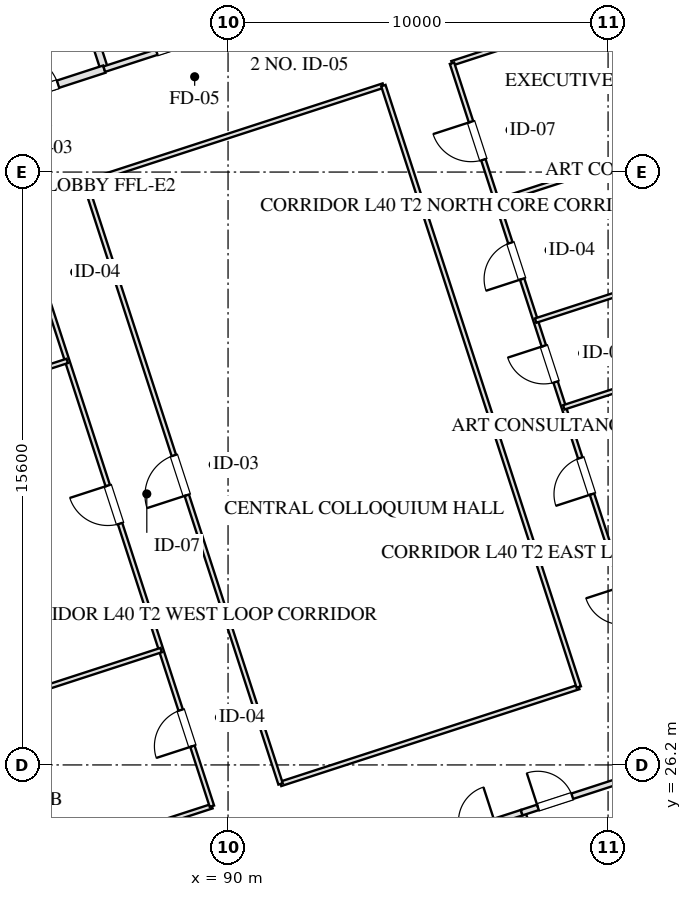
"""IFC4 building model, lengths in metres.
Left out: names, types, materials, properties, quantities, classifications, styles, units other than length and angle.
Written with IfcOpenShell. Run it as: python <this file> out.ifc"""

import sys

from ifc_helpers import new_model, si_unit, direction, frame, frame_2d, origin, place, context, subcontext, project, spatial, rectangle, extrude, element, fill, save


model = new_model("IFC4")
c1 = context("Model", 3, precision=1e-05, world=origin(), true_north=direction((0.0, 1.0)))
c2 = subcontext(c1, "Body", "Model", "MODEL_VIEW")
j1 = project(units=[si_unit("LENGTHUNIT", "METRE"), si_unit("PLANEANGLEUNIT", "RADIAN")], contexts=[c1])
p1 = place(None, origin())
s1 = spatial("IfcSite", under=j1, at=p1, CompositionType="ELEMENT")
p2 = place(p1, origin())
s2 = spatial("IfcBuilding", under=s1, at=p2, CompositionType="ELEMENT")
p3 = place(p2, frame((0.0, 0.0, 152.95)))
s3 = spatial("IfcBuildingStorey", under=s2, at=p3, CompositionType="ELEMENT", Elevation=152.95)
p4 = place(p3, frame((98.224, 59.173, 0.0), z_axis=(0.0, 0.0, 1.0), x_axis=(0.309014228706, -0.951057414911, 0.0)))
e1 = element("IfcWall", 1, at=p4, inside=s3, PredefinedType="SOLIDWALL", context=c2, shape_type="SweptSolid", body=[
    extrude(rectangle(XDim=42.8, YDim=0.4, at=frame_2d((21.4, 0.0))), origin(), (0.0, 0.0, 1.0), 2.61),
])
p5 = place(p4, frame((23.95, 0.0, 0.0)))
e2 = element("IfcOpeningElement", 2, at=p5, cuts=e1, PredefinedType="OPENING", context=c2, shape_type="SweptSolid", body=[
    extrude(rectangle(XDim=1.1, YDim=2.15, at=frame_2d((0.55, 1.075))), frame((0.0, 0.21, 0.0), z_axis=(0.0, -1.0, 0.0), x_axis=(1.0, 0.0, 0.0)), (0.0, 0.0, 1.0), 0.42),
])
p6 = place(p3, frame((97.727, 24.944, 0.0), z_axis=(0.0, 0.0, 1.0), x_axis=(0.309016001439, -0.951056838919, 0.0)))
e3 = element("IfcWall", 3, at=p6, inside=s3, PredefinedType="PARTITIONING", context=c2, shape_type="SweptSolid", body=[
    extrude(rectangle(XDim=8.43, YDim=0.2, at=frame_2d((4.215, 0.0))), origin(), (0.0, 0.0, 1.0), 3.175),
])
p7 = place(p3, frame((93.542, 23.585, 0.0), z_axis=(0.0, 0.0, 1.0), x_axis=(0.951063829732, 0.308994485023, 0.0)))
e4 = element("IfcWall", 4, at=p7, inside=s3, PredefinedType="PARTITIONING", context=c2, shape_type="SweptSolid", body=[
    extrude(rectangle(XDim=4.4, YDim=0.15, at=frame_2d((2.2, 0.0))), origin(), (0.0, 0.0, 1.0), 3.175),
])
p8 = place(p7, frame((0.55, 0.0, 0.0)))
e5 = element("IfcOpeningElement", 5, at=p8, cuts=e4, PredefinedType="OPENING", context=c2, shape_type="SweptSolid", body=[
    extrude(rectangle(XDim=0.95, YDim=2.05, at=frame_2d((0.475, 1.025))), frame((0.0, 0.085, 0.0), z_axis=(0.0, -1.0, 0.0), x_axis=(1.0, 0.0, 0.0)), (0.0, 0.0, 1.0), 0.17),
])
p9 = place(p7, frame((2.7, 0.0, 0.0)))
e6 = element("IfcOpeningElement", 6, at=p9, cuts=e4, PredefinedType="OPENING", context=c2, shape_type="SweptSolid", body=[
    extrude(rectangle(XDim=0.95, YDim=2.05, at=frame_2d((0.475, 1.025))), frame((0.0, 0.085, 0.0), z_axis=(0.0, -1.0, 0.0), x_axis=(1.0, 0.0, 0.0)), (0.0, 0.0, 1.0), 0.17),
])
p10 = place(p3, frame((97.727, 24.944, 0.0), z_axis=(0.0, 0.0, 1.0), x_axis=(0.951036872128, 0.309077446369, 0.0)))
e7 = element("IfcWall", 7, at=p10, inside=s3, PredefinedType="PARTITIONING", context=c2, shape_type="SweptSolid", body=[
    extrude(rectangle(XDim=3.2, YDim=0.15, at=frame_2d((1.6, 0.0))), origin(), (0.0, 0.0, 1.0), 3.175),
])
p11 = place(p10, frame((0.45, 0.0, 0.0)))
e8 = element("IfcOpeningElement", 8, at=p11, cuts=e7, PredefinedType="OPENING", context=c2, shape_type="SweptSolid", body=[
    extrude(rectangle(XDim=0.95, YDim=2.05, at=frame_2d((0.475, 1.025))), frame((0.0, 0.085, 0.0), z_axis=(0.0, -1.0, 0.0), x_axis=(1.0, 0.0, 0.0)), (0.0, 0.0, 1.0), 0.17),
])
p12 = place(p3, frame((86.743, 44.508, 0.0), z_axis=(0.0, 0.0, 1.0), x_axis=(-0.309016001439, 0.951056838919, 0.0)))
e9 = element("IfcWall", 9, at=p12, inside=s3, PredefinedType="PARTITIONING", context=c2, shape_type="SweptSolid", body=[
    extrude(rectangle(XDim=8.43, YDim=0.2, at=frame_2d((4.215, 0.0))), origin(), (0.0, 0.0, 1.0), 3.175),
])
p13 = place(p3, frame((83.101, 43.324, 0.0), z_axis=(0.0, 0.0, 1.0), x_axis=(0.951052804469, 0.309028417967, 0.0)))
e10 = element("IfcWall", 10, at=p13, inside=s3, PredefinedType="PARTITIONING", context=c2, shape_type="SweptSolid", body=[
    extrude(rectangle(XDim=3.83, YDim=0.2, at=frame_2d((1.915, 0.0))), origin(), (0.0, 0.0, 1.0), 3.175),
])
p14 = place(p13, frame((1.35, 0.0, 0.0)))
e11 = element("IfcOpeningElement", 11, at=p14, cuts=e10, PredefinedType="OPENING", context=c2, shape_type="SweptSolid", body=[
    extrude(rectangle(XDim=1.2, YDim=2.05, at=frame_2d((0.6, 1.025))), frame((0.0, 0.11, 0.0), z_axis=(0.0, -1.0, 0.0), x_axis=(1.0, 0.0, 0.0)), (0.0, 0.0, 1.0), 0.22),
])
p15 = place(p3, frame((86.743, 44.508, 0.0), z_axis=(0.0, 0.0, 1.0), x_axis=(0.951063829732, 0.308994485023, 0.0)))
e12 = element("IfcWall", 12, at=p15, inside=s3, PredefinedType="PARTITIONING", context=c2, shape_type="SweptSolid", body=[
    extrude(rectangle(XDim=4.4, YDim=0.15, at=frame_2d((2.2, 0.0))), origin(), (0.0, 0.0, 1.0), 3.175),
])
p16 = place(p15, frame((1.45, 0.0, 0.0)))
e13 = element("IfcOpeningElement", 13, at=p16, cuts=e12, PredefinedType="OPENING", context=c2, shape_type="SweptSolid", body=[
    extrude(rectangle(XDim=1.5, YDim=2.05, at=frame_2d((0.75, 1.025))), frame((0.0, 0.085, 0.0), z_axis=(0.0, -1.0, 0.0), x_axis=(1.0, 0.0, 0.0)), (0.0, 0.0, 1.0), 0.17),
])
p17 = place(p3, frame((77.925, 21.328, 0.0), z_axis=(0.0, 0.0, 1.0), x_axis=(0.95105749975, 0.309013967595, 0.0)))
e14 = element("IfcWall", 14, at=p17, inside=s3, PredefinedType="PARTITIONING", context=c2, shape_type="SweptSolid", body=[
    extrude(rectangle(XDim=12.25, YDim=0.12, at=frame_2d((6.125, 0.0))), origin(), (0.0, 0.0, 1.0), 3.175),
])
p18 = place(p3, frame((91.382, 25.701, 0.0), z_axis=(0.0, 0.0, 1.0), x_axis=(0.951061683147, 0.309001091988, 0.0)))
e15 = element("IfcWall", 15, at=p18, inside=s3, PredefinedType="PARTITIONING", context=c2, shape_type="SweptSolid", body=[
    extrude(rectangle(XDim=8.25, YDim=0.12, at=frame_2d((4.125, 0.0))), origin(), (0.0, 0.0, 1.0), 3.175),
])
p19 = place(p3, frame((86.24, 41.527, 0.0), z_axis=(0.0, 0.0, 1.0), x_axis=(0.951058857521, 0.309009788731, 0.0)))
e16 = element("IfcWall", 16, at=p19, inside=s3, PredefinedType="PARTITIONING", context=c2, shape_type="SweptSolid", body=[
    extrude(rectangle(XDim=8.25, YDim=0.12, at=frame_2d((4.125, 0.0))), origin(), (0.0, 0.0, 1.0), 3.175),
])
p20 = place(p3, frame((95.893, 44.663, 0.0), z_axis=(0.0, 0.0, 1.0), x_axis=(0.951059735424, 0.30900708674, 0.0)))
e17 = element("IfcWall", 17, at=p20, inside=s3, PredefinedType="PARTITIONING", context=c2, shape_type="SweptSolid", body=[
    extrude(rectangle(XDim=6.5, YDim=0.12, at=frame_2d((3.25, 0.0))), origin(), (0.0, 0.0, 1.0), 3.175),
])
p21 = place(p3, frame((89.575, 25.114, 0.0), z_axis=(0.0, 0.0, 1.0), x_axis=(-0.30901773025, 0.951056277195, 0.0)))
e18 = element("IfcWall", 18, at=p21, inside=s3, PredefinedType="PARTITIONING", context=c2, shape_type="SweptSolid", body=[
    extrude(rectangle(XDim=16.64, YDim=0.12, at=frame_2d((8.32, 0.0))), origin(), (0.0, 0.0, 1.0), 3.175),
])
p22 = place(p21, frame((1.66, 0.0, 0.0)))
e19 = element("IfcOpeningElement", 19, at=p22, cuts=e18, PredefinedType="OPENING", context=c2, shape_type="SweptSolid", body=[
    extrude(rectangle(XDim=1.0, YDim=2.05, at=frame_2d((0.5, 1.025))), frame((0.0, 0.07, 0.0), z_axis=(0.0, -1.0, 0.0), x_axis=(1.0, 0.0, 0.0)), (0.0, 0.0, 1.0), 0.14),
])
p23 = place(p21, frame((7.82, 0.0, 0.0)))
e20 = element("IfcOpeningElement", 20, at=p23, cuts=e18, PredefinedType="OPENING", context=c2, shape_type="SweptSolid", body=[
    extrude(rectangle(XDim=1.05, YDim=2.05, at=frame_2d((0.525, 1.025))), frame((0.0, 0.07, 0.0), z_axis=(0.0, -1.0, 0.0), x_axis=(1.0, 0.0, 0.0)), (0.0, 0.0, 1.0), 0.14),
])
p24 = place(p21, frame((13.98, 0.0, 0.0)))
e21 = element("IfcOpeningElement", 21, at=p24, cuts=e18, PredefinedType="OPENING", context=c2, shape_type="SweptSolid", body=[
    extrude(rectangle(XDim=1.0, YDim=2.05, at=frame_2d((0.5, 1.025))), frame((0.0, 0.07, 0.0), z_axis=(0.0, -1.0, 0.0), x_axis=(1.0, 0.0, 0.0)), (0.0, 0.0, 1.0), 0.14),
])
p25 = place(p3, frame((91.382, 25.701, 0.0), z_axis=(0.0, 0.0, 1.0), x_axis=(-0.309004459387, 0.951060589068, 0.0)))
e22 = element("IfcWall", 22, at=p25, inside=s3, PredefinedType="PARTITIONING", context=c2, shape_type="SweptSolid", body=[
    extrude(rectangle(XDim=16.64, YDim=0.12, at=frame_2d((8.32, 0.0))), origin(), (0.0, 0.0, 1.0), 3.175),
])
p26 = place(p25, frame((7.987, 0.0, 0.0)))
e23 = element("IfcOpeningElement", 23, at=p26, cuts=e22, PredefinedType="OPENING", context=c2, shape_type="SweptSolid", body=[
    extrude(rectangle(XDim=1.1, YDim=2.05, at=frame_2d((0.55, 1.025))), frame((0.0, 0.07, 0.0), z_axis=(0.0, -1.0, 0.0), x_axis=(1.0, 0.0, 0.0)), (0.0, 0.0, 1.0), 0.14),
])
p27 = place(p3, frame((99.229, 28.25, 0.0), z_axis=(0.0, 0.0, 1.0), x_axis=(-0.30901773025, 0.951056277195, 0.0)))
e24 = element("IfcWall", 24, at=p27, inside=s3, PredefinedType="PARTITIONING", context=c2, shape_type="SweptSolid", body=[
    extrude(rectangle(XDim=16.64, YDim=0.12, at=frame_2d((8.32, 0.0))), origin(), (0.0, 0.0, 1.0), 3.175),
])
p28 = place(p3, frame((101.035, 28.837, 0.0), z_axis=(0.0, 0.0, 1.0), x_axis=(-0.30901773025, 0.951056277195, 0.0)))
e25 = element("IfcWall", 25, at=p28, inside=s3, PredefinedType="PARTITIONING", context=c2, shape_type="SweptSolid", body=[
    extrude(rectangle(XDim=16.64, YDim=0.12, at=frame_2d((8.32, 0.0))), origin(), (0.0, 0.0, 1.0), 3.175),
])
p29 = place(p28, frame((1.16, 0.0, 0.0)))
e26 = element("IfcOpeningElement", 26, at=p29, cuts=e25, PredefinedType="OPENING", context=c2, shape_type="SweptSolid", body=[
    extrude(rectangle(XDim=1.0, YDim=2.05, at=frame_2d((0.5, 1.025))), frame((0.0, 0.07, 0.0), z_axis=(0.0, -1.0, 0.0), x_axis=(1.0, 0.0, 0.0)), (0.0, 0.0, 1.0), 0.14),
])
p30 = place(p28, frame((4.72, 0.0, 0.0)))
e27 = element("IfcOpeningElement", 27, at=p30, cuts=e25, PredefinedType="OPENING", context=c2, shape_type="SweptSolid", body=[
    extrude(rectangle(XDim=1.0, YDim=2.05, at=frame_2d((0.5, 1.025))), frame((0.0, 0.07, 0.0), z_axis=(0.0, -1.0, 0.0), x_axis=(1.0, 0.0, 0.0)), (0.0, 0.0, 1.0), 0.14),
])
p31 = place(p28, frame((7.82, 0.0, 0.0)))
e28 = element("IfcOpeningElement", 28, at=p31, cuts=e25, PredefinedType="OPENING", context=c2, shape_type="SweptSolid", body=[
    extrude(rectangle(XDim=1.0, YDim=2.05, at=frame_2d((0.5, 1.025))), frame((0.0, 0.07, 0.0), z_axis=(0.0, -1.0, 0.0), x_axis=(1.0, 0.0, 0.0)), (0.0, 0.0, 1.0), 0.14),
])
p32 = place(p28, frame((10.671, 0.0, 0.0)))
e29 = element("IfcOpeningElement", 29, at=p32, cuts=e25, PredefinedType="OPENING", context=c2, shape_type="SweptSolid", body=[
    extrude(rectangle(XDim=1.0, YDim=2.05, at=frame_2d((0.5, 1.025))), frame((0.0, 0.07, 0.0), z_axis=(0.0, -1.0, 0.0), x_axis=(1.0, 0.0, 0.0)), (0.0, 0.0, 1.0), 0.14),
])
p33 = place(p28, frame((13.971, 0.0, 0.0)))
e30 = element("IfcOpeningElement", 30, at=p33, cuts=e25, PredefinedType="OPENING", context=c2, shape_type="SweptSolid", body=[
    extrude(rectangle(XDim=1.05, YDim=2.05, at=frame_2d((0.525, 1.025))), frame((0.0, 0.07, 0.0), z_axis=(0.0, -1.0, 0.0), x_axis=(1.0, 0.0, 0.0)), (0.0, 0.0, 1.0), 0.14),
])
for number, where, z_axis, x_axis in (
    (31, (76.59, 25.437, 0.0), (0.0, 0.0, 1.0), (0.951, 0.309, 0.0)),
    (32, (74.118, 33.045, 0.0), (0.0, 0.0, 1.0), (0.951, 0.309, 0.0)),
):
    element("IfcWall", number, at=place(p3, frame(where, z_axis=z_axis, x_axis=x_axis)), inside=s3, PredefinedType="PARTITIONING", context=c2, shape_type="SweptSolid", body=[
        extrude(rectangle(XDim=12.25, YDim=0.12, at=frame_2d((6.125, 0.0))), origin(), (0.0, 0.0, 1.0), 3.175),
    ])
for number, where, z_axis, x_axis in (
    (33, (100.01, 31.995, 0.0), (0.0, 0.0, 1.0), (0.951, 0.309, 0.0)),
    (34, (98.835, 35.609, 0.0), (0.0, 0.0, 1.0), (0.951, 0.309, 0.0)),
    (35, (98.094, 37.892, 0.0), (0.0, 0.0, 1.0), (0.951, 0.309, 0.0)),
    (36, (97.073, 41.031, 0.0), (0.0, 0.0, 1.0), (0.951, 0.309, 0.0)),
):
    element("IfcWall", number, at=place(p3, frame(where, z_axis=z_axis, x_axis=x_axis)), inside=s3, PredefinedType="PARTITIONING", context=c2, shape_type="SweptSolid", body=[
        extrude(rectangle(XDim=6.5, YDim=0.12, at=frame_2d((3.25, 0.0))), origin(), (0.0, 0.0, 1.0), 3.175),
    ])
p34 = place(p11, origin())
e37 = element("IfcDoor", 37, at=p34, inside=s3, OperationType="SINGLE_SWING_LEFT", PredefinedType="DOOR", context=c2, shape_type="SweptSolid", body=[
    extrude(rectangle(XDim=0.95, YDim=2.05, at=frame_2d((0.475, 1.025))), frame((0.0, 0.025, 0.0), z_axis=(0.0, -1.0, 0.0), x_axis=(1.0, 0.0, 0.0)), (0.0, 0.0, 1.0), 0.05),
])
fill(e8, e37)
p35 = place(p14, origin())
e38 = element("IfcDoor", 38, at=p35, inside=s3, OperationType="SINGLE_SWING_LEFT", PredefinedType="DOOR", context=c2, shape_type="SweptSolid", body=[
    extrude(rectangle(XDim=1.2, YDim=2.05, at=frame_2d((0.6, 1.025))), frame((0.0, 0.025, 0.0), z_axis=(0.0, -1.0, 0.0), x_axis=(1.0, 0.0, 0.0)), (0.0, 0.0, 1.0), 0.05),
])
fill(e11, e38)
p36 = place(p16, origin())
e39 = element("IfcDoor", 39, at=p36, inside=s3, OperationType="SINGLE_SWING_LEFT", PredefinedType="DOOR", context=c2, shape_type="SweptSolid", body=[
    extrude(rectangle(XDim=1.5, YDim=2.05, at=frame_2d((0.75, 1.025))), frame((0.0, 0.025, 0.0), z_axis=(0.0, -1.0, 0.0), x_axis=(1.0, 0.0, 0.0)), (0.0, 0.0, 1.0), 0.05),
])
fill(e13, e39)
p37 = place(p22, origin())
e40 = element("IfcDoor", 40, at=p37, inside=s3, OperationType="SINGLE_SWING_LEFT", PredefinedType="DOOR", context=c2, shape_type="SweptSolid", body=[
    extrude(rectangle(XDim=1.0, YDim=2.05, at=frame_2d((0.5, 1.025))), frame((0.0, 0.025, 0.0), z_axis=(0.0, -1.0, 0.0), x_axis=(1.0, 0.0, 0.0)), (0.0, 0.0, 1.0), 0.05),
])
fill(e19, e40)
p38 = place(p23, origin())
e41 = element("IfcDoor", 41, at=p38, inside=s3, OperationType="SINGLE_SWING_RIGHT", PredefinedType="DOOR", context=c2, shape_type="SweptSolid", body=[
    extrude(rectangle(XDim=1.05, YDim=2.05, at=frame_2d((0.525, 1.025))), frame((0.0, 0.025, 0.0), z_axis=(0.0, -1.0, 0.0), x_axis=(1.0, 0.0, 0.0)), (0.0, 0.0, 1.0), 0.05),
])
fill(e20, e41)
p39 = place(p26, origin())
e42 = element("IfcDoor", 42, at=p39, inside=s3, OperationType="SINGLE_SWING_LEFT", PredefinedType="DOOR", context=c2, shape_type="SweptSolid", body=[
    extrude(rectangle(XDim=1.1, YDim=2.05, at=frame_2d((0.55, 1.025))), frame((0.0, 0.025, 0.0), z_axis=(0.0, -1.0, 0.0), x_axis=(1.0, 0.0, 0.0)), (0.0, 0.0, 1.0), 0.05),
])
fill(e23, e42)
p40 = place(p30, origin())
e43 = element("IfcDoor", 43, at=p40, inside=s3, OperationType="SINGLE_SWING_LEFT", PredefinedType="DOOR", context=c2, shape_type="SweptSolid", body=[
    extrude(rectangle(XDim=1.0, YDim=2.05, at=frame_2d((0.5, 1.025))), frame((0.0, 0.025, 0.0), z_axis=(0.0, -1.0, 0.0), x_axis=(1.0, 0.0, 0.0)), (0.0, 0.0, 1.0), 0.05),
])
fill(e27, e43)
p41 = place(p31, origin())
e44 = element("IfcDoor", 44, at=p41, inside=s3, OperationType="SINGLE_SWING_RIGHT", PredefinedType="DOOR", context=c2, shape_type="SweptSolid", body=[
    extrude(rectangle(XDim=1.0, YDim=2.05, at=frame_2d((0.5, 1.025))), frame((0.0, 0.025, 0.0), z_axis=(0.0, -1.0, 0.0), x_axis=(1.0, 0.0, 0.0)), (0.0, 0.0, 1.0), 0.05),
])
fill(e28, e44)
p42 = place(p32, origin())
e45 = element("IfcDoor", 45, at=p42, inside=s3, OperationType="SINGLE_SWING_LEFT", PredefinedType="DOOR", context=c2, shape_type="SweptSolid", body=[
    extrude(rectangle(XDim=1.0, YDim=2.05, at=frame_2d((0.5, 1.025))), frame((0.0, 0.025, 0.0), z_axis=(0.0, -1.0, 0.0), x_axis=(1.0, 0.0, 0.0)), (0.0, 0.0, 1.0), 0.05),
])
fill(e29, e45)
p43 = place(p33, origin())
e46 = element("IfcDoor", 46, at=p43, inside=s3, OperationType="SINGLE_SWING_RIGHT", PredefinedType="DOOR", context=c2, shape_type="SweptSolid", body=[
    extrude(rectangle(XDim=1.05, YDim=2.05, at=frame_2d((0.525, 1.025))), frame((0.0, 0.025, 0.0), z_axis=(0.0, -1.0, 0.0), x_axis=(1.0, 0.0, 0.0)), (0.0, 0.0, 1.0), 0.05),
])
fill(e30, e46)
save(model, sys.argv[1])
